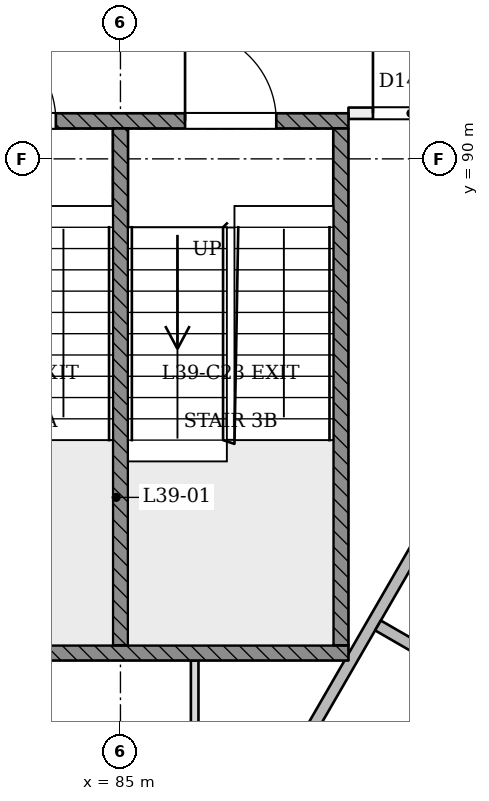
"""IFC4 building model, lengths in metres.
Left out: names, types, materials, properties, quantities, classifications, styles, units other than length and angle.
Written with IfcOpenShell. Run it as: python <this file> out.ifc"""

import sys

from ifc_helpers import new_model, si_unit, direction, frame, frame_2d, origin, place, context, subcontext, project, spatial, rectangle, extrude, element, fill, save


model = new_model("IFC4")
c1 = context("Model", 3, precision=1e-05, world=origin(), true_north=direction((0.0, 1.0)))
c2 = subcontext(c1, "Body", "Model", "MODEL_VIEW")
j1 = project(units=[si_unit("LENGTHUNIT", "METRE"), si_unit("PLANEANGLEUNIT", "RADIAN")], contexts=[c1])
p1 = place(None, origin())
s1 = spatial("IfcSite", under=j1, at=p1, CompositionType="ELEMENT")
p2 = place(p1, origin())
s2 = spatial("IfcBuilding", under=s1, at=p2, CompositionType="ELEMENT")
p3 = place(p2, frame((0.0, 0.0, 153.0)))
s3 = spatial("IfcBuildingStorey", under=s2, at=p3, CompositionType="ELEMENT", Elevation=153.0)
p4 = place(p3, frame((84.935, 70.611, 0.0), z_axis=(0.0, 0.0, 1.0), x_axis=(-0.500001185521, 0.866024719323, 0.0)))
e1 = element("IfcWall", 1, at=p4, inside=s3, PredefinedType="PARTITIONING", context=c2, shape_type="SweptSolid", body=[
    extrude(rectangle(XDim=22.62, YDim=0.15, at=frame_2d((11.31, 0.0))), origin(), (0.0, 0.0, 1.0), 3.15),
])
p5 = place(p4, frame((18.671, 0.0, 0.0)))
e2 = element("IfcOpeningElement", 2, at=p5, cuts=e1, PredefinedType="OPENING", context=c2, shape_type="SweptSolid", body=[
    extrude(rectangle(XDim=1.0, YDim=2.1, at=frame_2d((0.5, 1.05))), frame((0.0, 0.085, 0.0), z_axis=(0.0, -1.0, 0.0), x_axis=(1.0, 0.0, 0.0)), (0.0, 0.0, 1.0), 0.171),
])
p6 = place(p4, frame((7.991, 0.0, 0.0)))
e3 = element("IfcOpeningElement", 3, at=p6, cuts=e1, PredefinedType="OPENING", context=c2, shape_type="SweptSolid", body=[
    extrude(rectangle(XDim=1.0, YDim=2.1, at=frame_2d((0.5, 1.05))), frame((0.0, 0.085, 0.0), z_axis=(0.0, -1.0, 0.0), x_axis=(1.0, 0.0, 0.0)), (0.0, 0.0, 1.0), 0.171),
])
p7 = place(p4, frame((13.311, 0.0, 0.0)))
e4 = element("IfcOpeningElement", 4, at=p7, cuts=e1, PredefinedType="OPENING", context=c2, shape_type="SweptSolid", body=[
    extrude(rectangle(XDim=1.0, YDim=2.1, at=frame_2d((0.5, 1.05))), frame((0.0, 0.085, 0.0), z_axis=(0.0, -1.0, 0.0), x_axis=(1.0, 0.0, 0.0)), (0.0, 0.0, 1.0), 0.171),
])
p8 = place(p3, frame((88.0, 90.6, 0.0), z_axis=(0.0, 0.0, 1.0), x_axis=(0.999999969596, -0.000246593914, 0.0)))
e5 = element("IfcWall", 5, at=p8, inside=s3, PredefinedType="PARTITIONING", context=c2, shape_type="SweptSolid", body=[
    extrude(rectangle(XDim=3.96, YDim=0.15, at=frame_2d((1.98, 0.0))), origin(), (0.0, 0.0, 1.0), 3.15),
])
p9 = place(p8, frame((0.322, 0.0, 0.0)))
e6 = element("IfcOpeningElement", 6, at=p9, cuts=e5, PredefinedType="OPENING", context=c2, shape_type="SweptSolid", body=[
    extrude(rectangle(XDim=1.0, YDim=2.1, at=frame_2d((0.5, 1.05))), frame((0.0, 0.085, 0.0), z_axis=(0.0, -1.0, 0.0), x_axis=(1.0, 0.0, 0.0)), (0.0, 0.0, 1.0), 0.171),
])
p10 = place(p3, frame((66.242, 97.188, 0.0), z_axis=(0.0, 0.0, 1.0), x_axis=(0.500002614046, -0.866023894559, 0.0)))
e7 = element("IfcWall", 7, at=p10, inside=s3, PredefinedType="PARTITIONING", context=c2, shape_type="SweptSolid", body=[
    extrude(rectangle(XDim=37.515, YDim=0.15, at=frame_2d((18.758, 0.0))), origin(), (0.0, 0.0, 1.0), 2.75),
])
p11 = place(p10, frame((2.8, 0.0, 0.0)))
e8 = element("IfcOpeningElement", 8, at=p11, cuts=e7, PredefinedType="OPENING", context=c2, shape_type="SweptSolid", body=[
    extrude(rectangle(XDim=1.2, YDim=2.1, at=frame_2d((0.6, 1.05))), frame((0.0, 0.085, 0.0), z_axis=(0.0, -1.0, 0.0), x_axis=(1.0, 0.0, 0.0)), (0.0, 0.0, 1.0), 0.171),
])
p12 = place(p10, frame((11.8, 0.0, 0.0)))
e9 = element("IfcOpeningElement", 9, at=p12, cuts=e7, PredefinedType="OPENING", context=c2, shape_type="SweptSolid", body=[
    extrude(rectangle(XDim=1.2, YDim=2.1, at=frame_2d((0.6, 1.05))), frame((0.0, 0.085, 0.0), z_axis=(0.0, -1.0, 0.0), x_axis=(1.0, 0.0, 0.0)), (0.0, 0.0, 1.0), 0.171),
])
p13 = place(p10, frame((24.15, 0.0, 0.0)))
e10 = element("IfcOpeningElement", 10, at=p13, cuts=e7, PredefinedType="OPENING", context=c2, shape_type="SweptSolid", body=[
    extrude(rectangle(XDim=1.2, YDim=2.1, at=frame_2d((0.6, 1.05))), frame((0.0, 0.085, 0.0), z_axis=(0.0, -1.0, 0.0), x_axis=(1.0, 0.0, 0.0)), (0.0, 0.0, 1.0), 0.171),
])
p14 = place(p10, frame((33.25, 0.0, 0.0)))
e11 = element("IfcOpeningElement", 11, at=p14, cuts=e7, PredefinedType="OPENING", context=c2, shape_type="SweptSolid", body=[
    extrude(rectangle(XDim=1.0, YDim=2.1, at=frame_2d((0.5, 1.05))), frame((0.0, 0.085, 0.0), z_axis=(0.0, -1.0, 0.0), x_axis=(1.0, 0.0, 0.0)), (0.0, 0.0, 1.0), 0.171),
])
p15 = place(p3, frame((85.065, 64.811, 0.0), z_axis=(0.0, 0.0, 1.0), x_axis=(0.500003399299, 0.866023441189, 0.0)))
e12 = element("IfcWall", 12, at=p15, inside=s3, PredefinedType="PARTITIONING", context=c2, shape_type="SweptSolid", body=[
    extrude(rectangle(XDim=37.385, YDim=0.15, at=frame_2d((18.693, 0.0))), origin(), (0.0, 0.0, 1.0), 2.75),
])
p16 = place(p15, frame((0.524, 0.0, 0.0)))
e13 = element("IfcOpeningElement", 13, at=p16, cuts=e12, PredefinedType="OPENING", context=c2, shape_type="SweptSolid", body=[
    extrude(rectangle(XDim=1.2, YDim=2.1, at=frame_2d((0.6, 1.05))), frame((0.0, 0.085, 0.0), z_axis=(0.0, -1.0, 0.0), x_axis=(1.0, 0.0, 0.0)), (0.0, 0.0, 1.0), 0.171),
])
p17 = place(p15, frame((12.036, 0.0, 0.0)))
e14 = element("IfcOpeningElement", 14, at=p17, cuts=e12, PredefinedType="OPENING", context=c2, shape_type="SweptSolid", body=[
    extrude(rectangle(XDim=1.2, YDim=2.1, at=frame_2d((0.6, 1.05))), frame((0.0, 0.085, 0.0), z_axis=(0.0, -1.0, 0.0), x_axis=(1.0, 0.0, 0.0)), (0.0, 0.0, 1.0), 0.171),
])
p18 = place(p15, frame((22.186, 0.0, 0.0)))
e15 = element("IfcOpeningElement", 15, at=p18, cuts=e12, PredefinedType="OPENING", context=c2, shape_type="SweptSolid", body=[
    extrude(rectangle(XDim=1.2, YDim=2.1, at=frame_2d((0.6, 1.05))), frame((0.0, 0.085, 0.0), z_axis=(0.0, -1.0, 0.0), x_axis=(1.0, 0.0, 0.0)), (0.0, 0.0, 1.0), 0.171),
])
p19 = place(p15, frame((31.186, 0.0, 0.0)))
e16 = element("IfcOpeningElement", 16, at=p19, cuts=e12, PredefinedType="OPENING", context=c2, shape_type="SweptSolid", body=[
    extrude(rectangle(XDim=1.2, YDim=2.1, at=frame_2d((0.6, 1.05))), frame((0.0, 0.085, 0.0), z_axis=(0.0, -1.0, 0.0), x_axis=(1.0, 0.0, 0.0)), (0.0, 0.0, 1.0), 0.171),
])
p20 = place(p3, frame((96.375, 90.2, 0.0), z_axis=(0.0, 0.0, 1.0), x_axis=(-0.499999903229, -0.866025459655, 0.0)))
e17 = element("IfcWall", 17, at=p20, inside=s3, PredefinedType="PARTITIONING", context=c2, shape_type="SweptSolid", body=[
    extrude(rectangle(XDim=22.75, YDim=0.15, at=frame_2d((11.375, 0.0))), origin(), (0.0, 0.0, 1.0), 3.15),
])
p21 = place(p20, frame((2.353, 0.0, 0.0)))
e18 = element("IfcOpeningElement", 18, at=p21, cuts=e17, PredefinedType="OPENING", context=c2, shape_type="SweptSolid", body=[
    extrude(rectangle(XDim=0.9, YDim=2.1, at=frame_2d((0.45, 1.05))), frame((0.0, 0.085, 0.0), z_axis=(0.0, -1.0, 0.0), x_axis=(1.0, 0.0, 0.0)), (0.0, 0.0, 1.0), 0.171),
])
p22 = place(p20, frame((20.831, 0.0, 0.0)))
e19 = element("IfcOpeningElement", 19, at=p22, cuts=e17, PredefinedType="OPENING", context=c2, shape_type="SweptSolid", body=[
    extrude(rectangle(XDim=0.9, YDim=2.1, at=frame_2d((0.45, 1.05))), frame((0.0, 0.085, 0.0), z_axis=(0.0, -1.0, 0.0), x_axis=(1.0, 0.0, 0.0)), (0.0, 0.0, 1.0), 0.171),
])
p23 = place(p20, frame((6.636, 0.0, 0.0)))
e20 = element("IfcOpeningElement", 20, at=p23, cuts=e17, PredefinedType="OPENING", context=c2, shape_type="SweptSolid", body=[
    extrude(rectangle(XDim=1.0, YDim=2.1, at=frame_2d((0.5, 1.05))), frame((0.0, 0.085, 0.0), z_axis=(0.0, -1.0, 0.0), x_axis=(1.0, 0.0, 0.0)), (0.0, 0.0, 1.0), 0.171),
])
p24 = place(p20, frame((13.212, 0.0, 0.0)))
e21 = element("IfcOpeningElement", 21, at=p24, cuts=e17, PredefinedType="OPENING", context=c2, shape_type="SweptSolid", body=[
    extrude(rectangle(XDim=1.0, YDim=2.1, at=frame_2d((0.5, 1.05))), frame((0.0, 0.085, 0.0), z_axis=(0.0, -1.0, 0.0), x_axis=(1.0, 0.0, 0.0)), (0.0, 0.0, 1.0), 0.171),
])
p25 = place(p3, frame((85.977, 79.835, 0.0), z_axis=(0.0, 0.0, 1.0), x_axis=(0.499999377474, 0.8660257632, 0.0)))
e22 = element("IfcWall", 22, at=p25, inside=s3, PredefinedType="PARTITIONING", context=c2, shape_type="SweptSolid", body=[
    extrude(rectangle(XDim=9.387, YDim=0.15, at=frame_2d((4.693, 0.0))), origin(), (0.0, 0.0, 1.0), 3.15),
])
p26 = place(p3, frame((85.977, 83.4, 0.0), z_axis=(0.0, 0.0, 1.0), x_axis=(0.0, -1.0, 0.0)))
e23 = element("IfcWall", 23, at=p26, inside=s3, PredefinedType="PARTITIONING", context=c2, shape_type="SweptSolid", body=[
    extrude(rectangle(XDim=3.328, YDim=0.1, at=frame_2d((1.664, 0.0))), origin(), (0.0, 0.0, 1.0), 3.15),
])
p27 = place(p3, frame((88.388, 83.862, 0.0), z_axis=(0.0, 0.0, 1.0), x_axis=(0.866046108183, -0.499964137215, 0.0)))
e24 = element("IfcWall", 24, at=p27, inside=s3, PredefinedType="PARTITIONING", context=c2, shape_type="SweptSolid", body=[
    extrude(rectangle(XDim=3.673, YDim=0.15, at=frame_2d((1.836, 0.0))), origin(), (0.0, 0.0, 1.0), 3.15),
])
p28 = place(p3, frame((82.0, 90.5, 0.0), z_axis=(0.0, 0.0, 1.0), x_axis=(1.0, 0.0, 0.0)))
e25 = element("IfcWall", 25, at=p28, inside=s3, PredefinedType="SOLIDWALL", context=c2, shape_type="SweptSolid", body=[
    extrude(rectangle(XDim=6.0, YDim=0.2, at=frame_2d((3.0, 0.0))), origin(), (0.0, 0.0, 1.0), 3.15),
])
p29 = place(p28, frame((0.95, 0.0, 0.0)))
e26 = element("IfcOpeningElement", 26, at=p29, cuts=e25, PredefinedType="OPENING", context=c2, shape_type="SweptSolid", body=[
    extrude(rectangle(XDim=1.2, YDim=2.1, at=frame_2d((0.6, 1.05))), frame((0.0, 0.11, 0.0), z_axis=(0.0, -1.0, 0.0), x_axis=(1.0, 0.0, 0.0)), (0.0, 0.0, 1.0), 0.221),
])
p30 = place(p28, frame((3.85, 0.0, 0.0)))
e27 = element("IfcOpeningElement", 27, at=p30, cuts=e25, PredefinedType="OPENING", context=c2, shape_type="SweptSolid", body=[
    extrude(rectangle(XDim=1.2, YDim=2.1, at=frame_2d((0.6, 1.05))), frame((0.0, 0.11, 0.0), z_axis=(0.0, -1.0, 0.0), x_axis=(1.0, 0.0, 0.0)), (0.0, 0.0, 1.0), 0.221),
])
p31 = place(p3, frame((82.0, 83.5, 0.0), z_axis=(0.0, 0.0, 1.0), x_axis=(1.0, 0.0, 0.0)))
e28 = element("IfcWall", 28, at=p31, inside=s3, PredefinedType="SOLIDWALL", context=c2, shape_type="SweptSolid", body=[
    extrude(rectangle(XDim=6.0, YDim=0.2, at=frame_2d((3.0, 0.0))), origin(), (0.0, 0.0, 1.0), 3.15),
])
for number, where, z_axis, x_axis in (
    (29, (87.9, 83.6, 0.0), (0.0, 0.0, 1.0), (0.0, 1.0, 0.0)),
    (30, (85.0, 83.6, 0.0), (0.0, 0.0, 1.0), (0.0, 1.0, 0.0)),
):
    element("IfcWall", number, at=place(p3, frame(where, z_axis=z_axis, x_axis=x_axis)), inside=s3, PredefinedType="SOLIDWALL", context=c2, shape_type="SweptSolid", body=[
        extrude(rectangle(XDim=6.8, YDim=0.2, at=frame_2d((3.4, 0.0))), origin(), (0.0, 0.0, 1.0), 3.15),
    ])
p32 = place(p9, origin())
e31 = element("IfcDoor", 31, at=p32, inside=s3, OperationType="SINGLE_SWING_LEFT", PredefinedType="NOTDEFINED", context=c2, shape_type="SweptSolid", body=[
    extrude(rectangle(XDim=1.0, YDim=2.1, at=frame_2d((0.5, 1.05))), frame((0.0, 0.025, 0.0), z_axis=(0.0, -1.0, 0.0), x_axis=(1.0, 0.0, 0.0)), (0.0, 0.0, 1.0), 0.05),
])
fill(e6, e31)
p33 = place(p29, origin())
e32 = element("IfcDoor", 32, at=p33, inside=s3, OperationType="SINGLE_SWING_LEFT", PredefinedType="NOTDEFINED", context=c2, shape_type="SweptSolid", body=[
    extrude(rectangle(XDim=1.2, YDim=2.1, at=frame_2d((0.6, 1.05))), frame((0.0, 0.025, 0.0), z_axis=(0.0, -1.0, 0.0), x_axis=(1.0, 0.0, 0.0)), (0.0, 0.0, 1.0), 0.05),
])
fill(e26, e32)
p34 = place(p30, origin())
e33 = element("IfcDoor", 33, at=p34, inside=s3, OperationType="SINGLE_SWING_LEFT", PredefinedType="NOTDEFINED", context=c2, shape_type="SweptSolid", body=[
    extrude(rectangle(XDim=1.2, YDim=2.1, at=frame_2d((0.6, 1.05))), frame((0.0, 0.025, 0.0), z_axis=(0.0, -1.0, 0.0), x_axis=(1.0, 0.0, 0.0)), (0.0, 0.0, 1.0), 0.05),
])
fill(e27, e33)
save(model, sys.argv[1])
